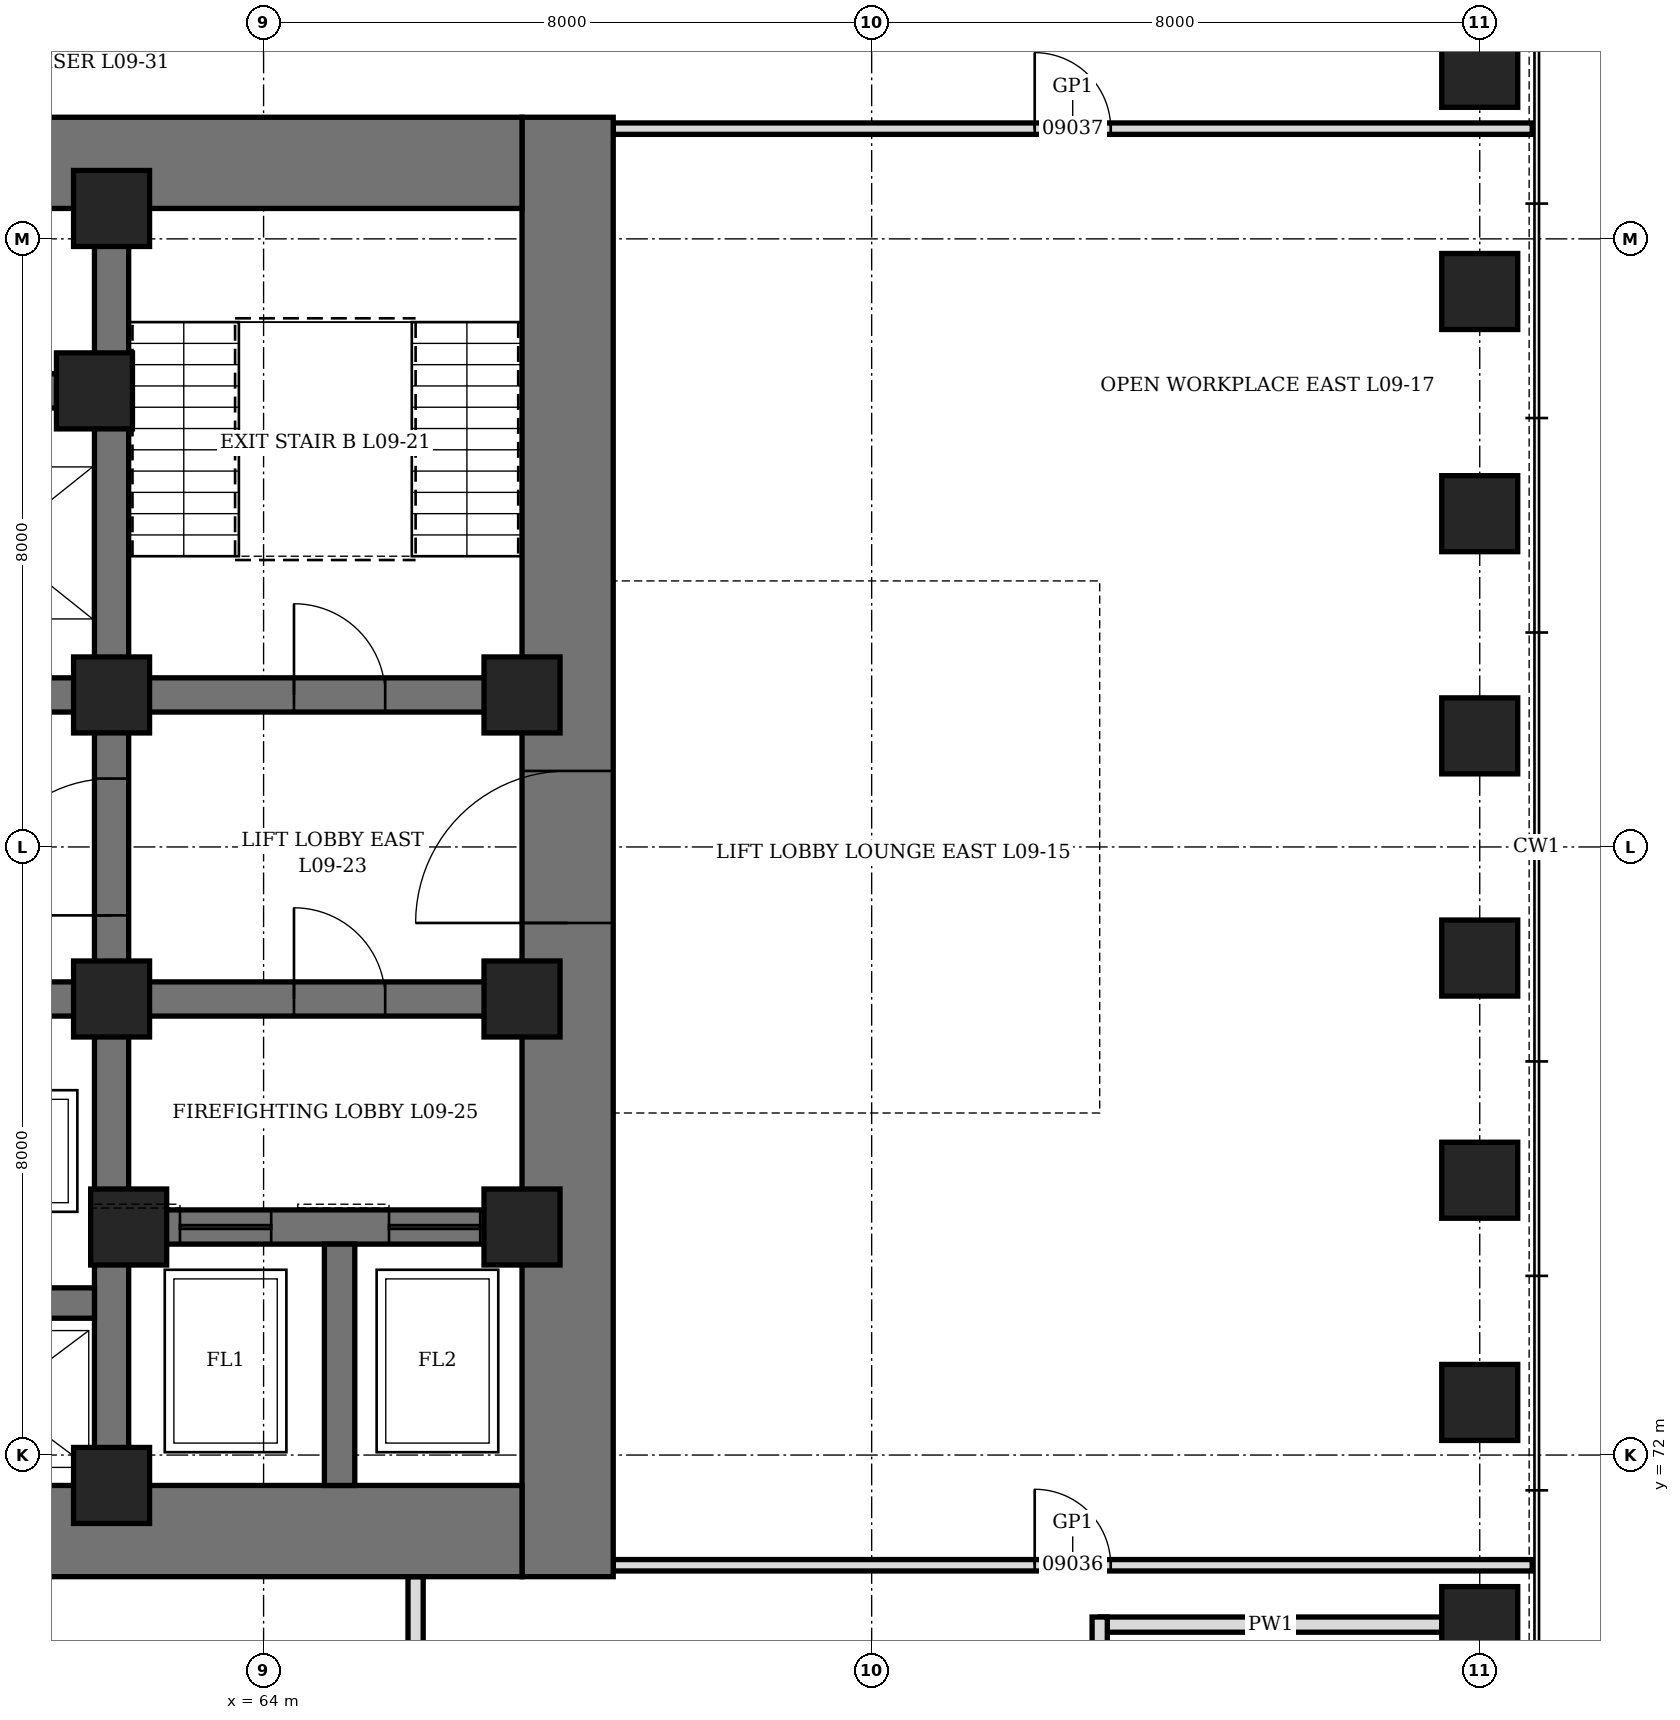
"""IFC4 building model, lengths in metres.
Left out: names, types, materials, properties, quantities, classifications, styles, units other than length and angle.
Written with IfcOpenShell. Run it as: python <this file> out.ifc"""

import sys

from ifc_helpers import new_model, si_unit, direction, frame, frame_2d, origin, origin_2d, place, context, subcontext, project, spatial, rectangle, hollow_rectangle, extrude, element, fill, save


model = new_model("IFC4")
c1 = context("Model", 3, precision=1e-05, world=origin(), true_north=direction((0.0, 1.0)))
c2 = subcontext(c1, "Body", "Model", "MODEL_VIEW")
j1 = project(units=[si_unit("LENGTHUNIT", "METRE"), si_unit("PLANEANGLEUNIT", "RADIAN")], contexts=[c1])
p1 = place(None, origin())
s1 = spatial("IfcSite", under=j1, at=p1, CompositionType="ELEMENT")
p2 = place(p1, origin())
s2 = spatial("IfcBuilding", under=s1, at=p2, CompositionType="ELEMENT")
p3 = place(p2, frame((0.0, 0.0, 47.5)))
s3 = spatial("IfcBuildingStorey", under=s2, at=p3, CompositionType="ELEMENT", Elevation=47.5)
for number, where, z_axis, x_axis in (
    (1, (80.0, 69.769, 0.0), (0.0, 0.0, 1.0), (0.0, 1.0, 0.0)),
    (2, (80.0, 72.692, 0.0), (0.0, 0.0, 1.0), (0.0, 1.0, 0.0)),
    (3, (80.0, 75.615, 0.0), (0.0, 0.0, 1.0), (0.0, 1.0, 0.0)),
    (4, (80.0, 78.539, 0.0), (0.0, 0.0, 1.0), (0.0, 1.0, 0.0)),
    (5, (80.0, 81.461, 0.0), (0.0, 0.0, 1.0), (0.0, 1.0, 0.0)),
    (6, (80.0, 84.385, 0.0), (0.0, 0.0, 1.0), (0.0, 1.0, 0.0)),
    (7, (80.0, 87.308, 0.0), (0.0, 0.0, 1.0), (0.0, 1.0, 0.0)),
    (8, (80.0, 90.231, 0.0), (0.0, 0.0, 1.0), (0.0, 1.0, 0.0)),
):
    element("IfcColumn", number, at=place(p3, frame(where, z_axis=z_axis, x_axis=x_axis)), inside=s3, PredefinedType="COLUMN", context=c2, shape_type="SweptSolid", body=[
        extrude(hollow_rectangle(XDim=1.0, YDim=1.0, WallThickness=0.25, at=origin_2d()), origin(), (0.0, 0.0, 1.0), 4.2),
    ])
p4 = place(p3, frame((68.0, 70.4, 0.0), z_axis=(0.0, 0.0, 1.0), x_axis=(0.0, 1.0, 0.0)))
e9 = element("IfcWall", 9, at=p4, inside=s3, PredefinedType="SHEAR", context=c2, shape_type="SweptSolid", body=[
    extrude(rectangle(XDim=19.2, YDim=1.2, at=frame_2d((9.6, 0.0))), origin(), (0.0, 0.0, 1.0), 4.2),
])
p5 = place(p4, frame((8.6, 0.0, 0.0)))
e10 = element("IfcOpeningElement", 10, at=p5, cuts=e9, PredefinedType="OPENING", context=c2, shape_type="SweptSolid", body=[
    extrude(rectangle(XDim=2.0, YDim=2.4, at=frame_2d((1.0, 1.2))), frame((0.0, 0.61, 0.0), z_axis=(0.0, -1.0, 0.0), x_axis=(1.0, 0.0, 0.0)), (0.0, 0.0, 1.0), 1.22),
])
p6 = place(p3, frame((44.6, 71.0, 0.0), z_axis=(0.0, 0.0, 1.0), x_axis=(1.0, 0.0, 0.0)))
e11 = element("IfcWall", 11, at=p6, inside=s3, PredefinedType="SHEAR", context=c2, shape_type="SweptSolid", body=[
    extrude(rectangle(XDim=22.8, YDim=1.2, at=frame_2d((11.4, 0.0))), origin(), (0.0, 0.0, 1.0), 4.2),
])
p7 = place(p3, frame((44.6, 89.0, 0.0), z_axis=(0.0, 0.0, 1.0), x_axis=(1.0, 0.0, 0.0)))
e12 = element("IfcWall", 12, at=p7, inside=s3, PredefinedType="SHEAR", context=c2, shape_type="SweptSolid", body=[
    extrude(rectangle(XDim=22.8, YDim=1.2, at=frame_2d((11.4, 0.0))), origin(), (0.0, 0.0, 1.0), 4.2),
])
p8 = place(p7, frame((6.325, 0.0, 0.0)))
e13 = element("IfcOpeningElement", 13, at=p8, cuts=e12, PredefinedType="OPENING", context=c2, shape_type="SweptSolid", body=[
    extrude(rectangle(XDim=1.0, YDim=2.1, at=frame_2d((0.5, 1.05))), frame((0.0, 0.61, 0.0), z_axis=(0.0, -1.0, 0.0), x_axis=(1.0, 0.0, 0.0)), (0.0, 0.0, 1.0), 1.22),
])
p9 = place(p7, frame((9.25, 0.0, 0.0)))
e14 = element("IfcOpeningElement", 14, at=p9, cuts=e12, PredefinedType="OPENING", context=c2, shape_type="SweptSolid", body=[
    extrude(rectangle(XDim=0.9, YDim=2.1, at=frame_2d((0.45, 1.05))), frame((0.0, 0.61, 0.0), z_axis=(0.0, -1.0, 0.0), x_axis=(1.0, 0.0, 0.0)), (0.0, 0.0, 1.0), 1.22),
])
p10 = place(p7, frame((13.012, 0.0, 0.0)))
e15 = element("IfcOpeningElement", 15, at=p10, cuts=e12, PredefinedType="OPENING", context=c2, shape_type="SweptSolid", body=[
    extrude(rectangle(XDim=0.9, YDim=2.1, at=frame_2d((0.45, 1.05))), frame((0.0, 0.61, 0.0), z_axis=(0.0, -1.0, 0.0), x_axis=(1.0, 0.0, 0.0)), (0.0, 0.0, 1.0), 1.22),
])
p11 = place(p3, frame((62.0, 71.6, 0.0), z_axis=(0.0, 0.0, 1.0), x_axis=(0.0, 1.0, 0.0)))
e16 = element("IfcWall", 16, at=p11, inside=s3, PredefinedType="SHEAR", context=c2, shape_type="SweptSolid", body=[
    extrude(rectangle(XDim=16.8, YDim=0.45, at=frame_2d((8.4, 0.0))), origin(), (0.0, 0.0, 1.0), 4.2),
])
p12 = place(p11, frame((7.5, 0.0, 0.0)))
e17 = element("IfcOpeningElement", 17, at=p12, cuts=e16, PredefinedType="OPENING", context=c2, shape_type="SweptSolid", body=[
    extrude(rectangle(XDim=1.8, YDim=2.4, at=frame_2d((0.9, 1.2))), frame((0.0, 0.235, 0.0), z_axis=(0.0, -1.0, 0.0), x_axis=(1.0, 0.0, 0.0)), (0.0, 0.0, 1.0), 0.47),
])
p13 = place(p3, frame((62.225, 75.0, 0.0), z_axis=(0.0, 0.0, 1.0), x_axis=(1.0, 0.0, 0.0)))
e18 = element("IfcWall", 18, at=p13, inside=s3, PredefinedType="SHEAR", context=c2, shape_type="SweptSolid", body=[
    extrude(rectangle(XDim=5.175, YDim=0.45, at=frame_2d((2.587, 0.0))), origin(), (0.0, 0.0, 1.0), 4.2),
])
p14 = place(p13, frame((0.675, 0.0, 0.0)))
e19 = element("IfcOpeningElement", 19, at=p14, cuts=e18, PredefinedType="OPENING", context=c2, shape_type="SweptSolid", body=[
    extrude(rectangle(XDim=1.2, YDim=2.2, at=frame_2d((0.6, 1.1))), frame((0.0, 0.235, 0.0), z_axis=(0.0, -1.0, 0.0), x_axis=(1.0, 0.0, 0.0)), (0.0, 0.0, 1.0), 0.47),
])
p15 = place(p13, frame((3.425, 0.0, 0.0)))
e20 = element("IfcOpeningElement", 20, at=p15, cuts=e18, PredefinedType="OPENING", context=c2, shape_type="SweptSolid", body=[
    extrude(rectangle(XDim=1.2, YDim=2.2, at=frame_2d((0.6, 1.1))), frame((0.0, 0.235, 0.0), z_axis=(0.0, -1.0, 0.0), x_axis=(1.0, 0.0, 0.0)), (0.0, 0.0, 1.0), 0.47),
])
p16 = place(p3, frame((62.225, 78.0, 0.0), z_axis=(0.0, 0.0, 1.0), x_axis=(1.0, 0.0, 0.0)))
e21 = element("IfcWall", 21, at=p16, inside=s3, PredefinedType="SHEAR", context=c2, shape_type="SweptSolid", body=[
    extrude(rectangle(XDim=5.175, YDim=0.45, at=frame_2d((2.587, 0.0))), origin(), (0.0, 0.0, 1.0), 4.2),
])
p17 = place(p16, frame((2.175, 0.0, 0.0)))
e22 = element("IfcOpeningElement", 22, at=p17, cuts=e21, PredefinedType="OPENING", context=c2, shape_type="SweptSolid", body=[
    extrude(rectangle(XDim=1.2, YDim=2.1, at=frame_2d((0.6, 1.05))), frame((0.0, 0.235, 0.0), z_axis=(0.0, -1.0, 0.0), x_axis=(1.0, 0.0, 0.0)), (0.0, 0.0, 1.0), 0.47),
])
p18 = place(p3, frame((62.225, 82.0, 0.0), z_axis=(0.0, 0.0, 1.0), x_axis=(1.0, 0.0, 0.0)))
e23 = element("IfcWall", 23, at=p18, inside=s3, PredefinedType="SHEAR", context=c2, shape_type="SweptSolid", body=[
    extrude(rectangle(XDim=5.175, YDim=0.45, at=frame_2d((2.587, 0.0))), origin(), (0.0, 0.0, 1.0), 4.2),
])
p19 = place(p18, frame((2.175, 0.0, 0.0)))
e24 = element("IfcOpeningElement", 24, at=p19, cuts=e23, PredefinedType="OPENING", context=c2, shape_type="SweptSolid", body=[
    extrude(rectangle(XDim=1.2, YDim=2.1, at=frame_2d((0.6, 1.05))), frame((0.0, 0.235, 0.0), z_axis=(0.0, -1.0, 0.0), x_axis=(1.0, 0.0, 0.0)), (0.0, 0.0, 1.0), 0.47),
])
p20 = place(p3, frame((50.225, 78.0, 0.0), z_axis=(0.0, 0.0, 1.0), x_axis=(1.0, 0.0, 0.0)))
e25 = element("IfcWall", 25, at=p20, inside=s3, PredefinedType="SHEAR", context=c2, shape_type="SweptSolid", body=[
    extrude(rectangle(XDim=11.55, YDim=0.45, at=frame_2d((5.775, 0.0))), origin(), (0.0, 0.0, 1.0), 4.2),
])
p21 = place(p20, frame((0.725, 0.0, 0.0)))
e26 = element("IfcOpeningElement", 26, at=p21, cuts=e25, PredefinedType="OPENING", context=c2, shape_type="SweptSolid", body=[
    extrude(rectangle(XDim=1.1, YDim=2.2, at=frame_2d((0.55, 1.1))), frame((0.0, 0.235, 0.0), z_axis=(0.0, -1.0, 0.0), x_axis=(1.0, 0.0, 0.0)), (0.0, 0.0, 1.0), 0.47),
])
p22 = place(p20, frame((3.725, 0.0, 0.0)))
e27 = element("IfcOpeningElement", 27, at=p22, cuts=e25, PredefinedType="OPENING", context=c2, shape_type="SweptSolid", body=[
    extrude(rectangle(XDim=1.1, YDim=2.2, at=frame_2d((0.55, 1.1))), frame((0.0, 0.235, 0.0), z_axis=(0.0, -1.0, 0.0), x_axis=(1.0, 0.0, 0.0)), (0.0, 0.0, 1.0), 0.47),
])
p23 = place(p20, frame((6.725, 0.0, 0.0)))
e28 = element("IfcOpeningElement", 28, at=p23, cuts=e25, PredefinedType="OPENING", context=c2, shape_type="SweptSolid", body=[
    extrude(rectangle(XDim=1.1, YDim=2.2, at=frame_2d((0.55, 1.1))), frame((0.0, 0.235, 0.0), z_axis=(0.0, -1.0, 0.0), x_axis=(1.0, 0.0, 0.0)), (0.0, 0.0, 1.0), 0.47),
])
p24 = place(p20, frame((9.725, 0.0, 0.0)))
e29 = element("IfcOpeningElement", 29, at=p24, cuts=e25, PredefinedType="OPENING", context=c2, shape_type="SweptSolid", body=[
    extrude(rectangle(XDim=1.1, YDim=2.2, at=frame_2d((0.55, 1.1))), frame((0.0, 0.235, 0.0), z_axis=(0.0, -1.0, 0.0), x_axis=(1.0, 0.0, 0.0)), (0.0, 0.0, 1.0), 0.47),
])
for number, where, z_axis, x_axis in (
    (30, (50.225, 82.0, 0.0), (0.0, 0.0, 1.0), (1.0, 0.0, 0.0)),
    (31, (50.225, 86.0, 0.0), (0.0, 0.0, 1.0), (1.0, 0.0, 0.0)),
):
    element("IfcWall", number, at=place(p3, frame(where, z_axis=z_axis, x_axis=x_axis)), inside=s3, PredefinedType="SHEAR", context=c2, shape_type="SweptSolid", body=[
        extrude(rectangle(XDim=11.55, YDim=0.45, at=frame_2d((5.775, 0.0))), origin(), (0.0, 0.0, 1.0), 4.2),
    ])
p25 = place(p3, frame((50.225, 74.0, 0.0), z_axis=(0.0, 0.0, 1.0), x_axis=(1.0, 0.0, 0.0)))
e32 = element("IfcWall", 32, at=p25, inside=s3, PredefinedType="SHEAR", context=c2, shape_type="SweptSolid", body=[
    extrude(rectangle(XDim=11.55, YDim=0.4, at=frame_2d((5.775, 0.0))), origin(), (0.0, 0.0, 1.0), 4.2),
])
p26 = place(p3, frame((65.0, 71.6, 0.0), z_axis=(0.0, 0.0, 1.0), x_axis=(0.0, 1.0, 0.0)))
e33 = element("IfcWall", 33, at=p26, inside=s3, PredefinedType="SHEAR", context=c2, shape_type="SweptSolid", body=[
    extrude(rectangle(XDim=3.175, YDim=0.4, at=frame_2d((1.587, 0.0))), origin(), (0.0, 0.0, 1.0), 4.2),
])
for number, where, z_axis, x_axis in (
    (34, (61.775, 86.0, 0.0), (0.0, 0.0, 1.0), (1.0, 0.0, 0.0)),
    (35, (62.0, 71.6, 0.0), (0.0, 0.0, 1.0), (1.0, 0.0, 0.0)),
    (36, (62.0, 78.0, 0.0), (0.0, 0.0, 1.0), (1.0, 0.0, 0.0)),
    (37, (62.0, 82.0, 0.0), (0.0, 0.0, 1.0), (1.0, 0.0, 0.0)),
    (38, (62.0, 88.4, 0.0), (0.0, 0.0, 1.0), (1.0, 0.0, 0.0)),
    (39, (62.225, 75.0, 0.0), (0.0, 0.0, 1.0), (1.0, 0.0, 0.0)),
    (40, (67.4, 75.0, 0.0), (0.0, 0.0, 1.0), (1.0, 0.0, 0.0)),
    (41, (67.4, 78.0, 0.0), (0.0, 0.0, 1.0), (1.0, 0.0, 0.0)),
    (42, (67.4, 82.0, 0.0), (0.0, 0.0, 1.0), (1.0, 0.0, 0.0)),
):
    element("IfcColumn", number, at=place(p3, frame(where, z_axis=z_axis, x_axis=x_axis)), inside=s3, PredefinedType="COLUMN", context=c2, shape_type="SweptSolid", body=[
        extrude(hollow_rectangle(XDim=1.0, YDim=1.0, WallThickness=0.15, at=origin_2d()), origin(), (0.0, 0.0, 1.0), 4.2),
    ])
p27 = place(p3, frame((75.0, 69.769, 0.0), z_axis=(0.0, 0.0, 1.0), x_axis=(1.0, 0.0, 0.0)))
e43 = element("IfcWall", 43, at=p27, inside=s3, PredefinedType="PARTITIONING", context=c2, shape_type="SweptSolid", body=[
    extrude(rectangle(XDim=4.5, YDim=0.2, at=frame_2d((2.25, 0.0))), origin(), (0.0, 0.0, 1.0), 3.428),
])
p28 = place(p3, frame((66.0, 66.8, 0.0), z_axis=(0.0, 0.0, 1.0), x_axis=(0.0, 1.0, 0.0)))
e44 = element("IfcWall", 44, at=p28, inside=s3, PredefinedType="PARTITIONING", context=c2, shape_type="SweptSolid", body=[
    extrude(rectangle(XDim=3.6, YDim=0.2, at=frame_2d((1.8, 0.0))), origin(), (0.0, 0.0, 1.0), 4.04),
])
p29 = place(p3, frame((68.6, 70.55, 0.0), z_axis=(0.0, 0.0, 1.0), x_axis=(1.0, 0.0, 0.0)))
e45 = element("IfcWall", 45, at=p29, inside=s3, PredefinedType="PARTITIONING", context=c2, shape_type="SweptSolid", body=[
    extrude(rectangle(XDim=12.09, YDim=0.15, at=frame_2d((6.045, 0.0))), origin(), (0.0, 0.0, 1.0), 4.04),
])
p30 = place(p29, frame((5.545, 0.0, 0.0)))
e46 = element("IfcOpeningElement", 46, at=p30, cuts=e45, PredefinedType="OPENING", context=c2, shape_type="SweptSolid", body=[
    extrude(rectangle(XDim=1.0, YDim=2.4, at=frame_2d((0.5, 1.2))), frame((0.0, 0.085, 0.0), z_axis=(0.0, -1.0, 0.0), x_axis=(1.0, 0.0, 0.0)), (0.0, 0.0, 1.0), 0.17),
])
p31 = place(p3, frame((68.6, 89.45, 0.0), z_axis=(0.0, 0.0, 1.0), x_axis=(1.0, 0.0, 0.0)))
e47 = element("IfcWall", 47, at=p31, inside=s3, PredefinedType="PARTITIONING", context=c2, shape_type="SweptSolid", body=[
    extrude(rectangle(XDim=12.09, YDim=0.15, at=frame_2d((6.045, 0.0))), origin(), (0.0, 0.0, 1.0), 4.04),
])
p32 = place(p31, frame((5.545, 0.0, 0.0)))
e48 = element("IfcOpeningElement", 48, at=p32, cuts=e47, PredefinedType="OPENING", context=c2, shape_type="SweptSolid", body=[
    extrude(rectangle(XDim=1.0, YDim=2.4, at=frame_2d((0.5, 1.2))), frame((0.0, 0.085, 0.0), z_axis=(0.0, -1.0, 0.0), x_axis=(1.0, 0.0, 0.0)), (0.0, 0.0, 1.0), 0.17),
])
p33 = place(p3, frame((75.0, 61.5, 0.0), z_axis=(0.0, 0.0, 1.0), x_axis=(0.0, 1.0, 0.0)))
e49 = element("IfcWall", 49, at=p33, inside=s3, PredefinedType="PARTITIONING", context=c2, shape_type="SweptSolid", body=[
    extrude(rectangle(XDim=8.369, YDim=0.2, at=frame_2d((4.185, 0.0))), origin(), (0.0, 0.0, 1.0), 4.04),
])
p34 = place(p33, frame((3.385, 0.0, 0.0)))
e50 = element("IfcOpeningElement", 50, at=p34, cuts=e49, PredefinedType="OPENING", context=c2, shape_type="SweptSolid", body=[
    extrude(rectangle(XDim=1.0, YDim=2.1, at=frame_2d((0.5, 1.05))), frame((0.0, 0.11, 0.0), z_axis=(0.0, -1.0, 0.0), x_axis=(1.0, 0.0, 0.0)), (0.0, 0.0, 1.0), 0.22),
])
p35 = place(p19, origin())
e51 = element("IfcDoor", 51, at=p35, inside=s3, OperationType="SINGLE_SWING_LEFT", PredefinedType="DOOR", context=c2, shape_type="SweptSolid", body=[
    extrude(rectangle(XDim=1.2, YDim=2.1, at=frame_2d((0.6, 1.05))), frame((0.0, 0.225, 0.0), z_axis=(0.0, -1.0, 0.0), x_axis=(1.0, 0.0, 0.0)), (0.0, 0.0, 1.0), 0.449),
])
fill(e24, e51)
p36 = place(p5, origin())
e52 = element("IfcDoor", 52, at=p36, inside=s3, OperationType="DOUBLE_DOOR_SINGLE_SWING", PredefinedType="DOOR", context=c2, shape_type="SweptSolid", body=[
    extrude(rectangle(XDim=2.0, YDim=2.4, at=frame_2d((1.0, 1.2))), frame((0.0, 0.35, 0.0), z_axis=(0.0, -1.0, 0.0), x_axis=(1.0, 0.0, 0.0)), (0.0, 0.0, 1.0), 0.7),
])
fill(e10, e52)
p37 = place(p12, origin())
e53 = element("IfcDoor", 53, at=p37, inside=s3, OperationType="DOUBLE_DOOR_SINGLE_SWING", PredefinedType="DOOR", context=c2, shape_type="SweptSolid", body=[
    extrude(rectangle(XDim=1.8, YDim=2.4, at=frame_2d((0.9, 1.2))), frame((0.0, 0.225, 0.0), z_axis=(0.0, -1.0, 0.0), x_axis=(1.0, 0.0, 0.0)), (0.0, 0.0, 1.0), 0.449),
])
fill(e17, e53)
p38 = place(p17, origin())
e54 = element("IfcDoor", 54, at=p38, inside=s3, OperationType="SINGLE_SWING_RIGHT", PredefinedType="DOOR", context=c2, shape_type="SweptSolid", body=[
    extrude(rectangle(XDim=1.2, YDim=2.1, at=frame_2d((0.6, 1.05))), frame((0.0, 0.225, 0.0), z_axis=(0.0, -1.0, 0.0), x_axis=(1.0, 0.0, 0.0)), (0.0, 0.0, 1.0), 0.449),
])
fill(e22, e54)
p39 = place(p14, origin())
e55 = element("IfcDoor", 55, at=p39, inside=s3, OperationType="SLIDING_TO_LEFT", PredefinedType="DOOR", context=c2, shape_type="SweptSolid", body=[
    extrude(rectangle(XDim=1.2, YDim=2.2, at=frame_2d((0.6, 1.1))), frame((0.0, 0.225, 0.0), z_axis=(0.0, -1.0, 0.0), x_axis=(1.0, 0.0, 0.0)), (0.0, 0.0, 1.0), 0.449),
])
fill(e19, e55)
p40 = place(p15, origin())
e56 = element("IfcDoor", 56, at=p40, inside=s3, OperationType="SLIDING_TO_LEFT", PredefinedType="DOOR", context=c2, shape_type="SweptSolid", body=[
    extrude(rectangle(XDim=1.2, YDim=2.2, at=frame_2d((0.6, 1.1))), frame((0.0, 0.225, 0.0), z_axis=(0.0, -1.0, 0.0), x_axis=(1.0, 0.0, 0.0)), (0.0, 0.0, 1.0), 0.449),
])
fill(e20, e56)
p41 = place(p30, origin())
e57 = element("IfcDoor", 57, at=p41, inside=s3, OperationType="SINGLE_SWING_RIGHT", PredefinedType="DOOR", context=c2, shape_type="SweptSolid", body=[
    extrude(rectangle(XDim=1.0, YDim=2.4, at=frame_2d((0.5, 1.2))), frame((0.0, 0.075, 0.0), z_axis=(0.0, -1.0, 0.0), x_axis=(1.0, 0.0, 0.0)), (0.0, 0.0, 1.0), 0.149),
])
fill(e46, e57)
p42 = place(p32, origin())
e58 = element("IfcDoor", 58, at=p42, inside=s3, OperationType="SINGLE_SWING_RIGHT", PredefinedType="DOOR", context=c2, shape_type="SweptSolid", body=[
    extrude(rectangle(XDim=1.0, YDim=2.4, at=frame_2d((0.5, 1.2))), frame((0.0, 0.075, 0.0), z_axis=(0.0, -1.0, 0.0), x_axis=(1.0, 0.0, 0.0)), (0.0, 0.0, 1.0), 0.149),
])
fill(e48, e58)
save(model, sys.argv[1])
